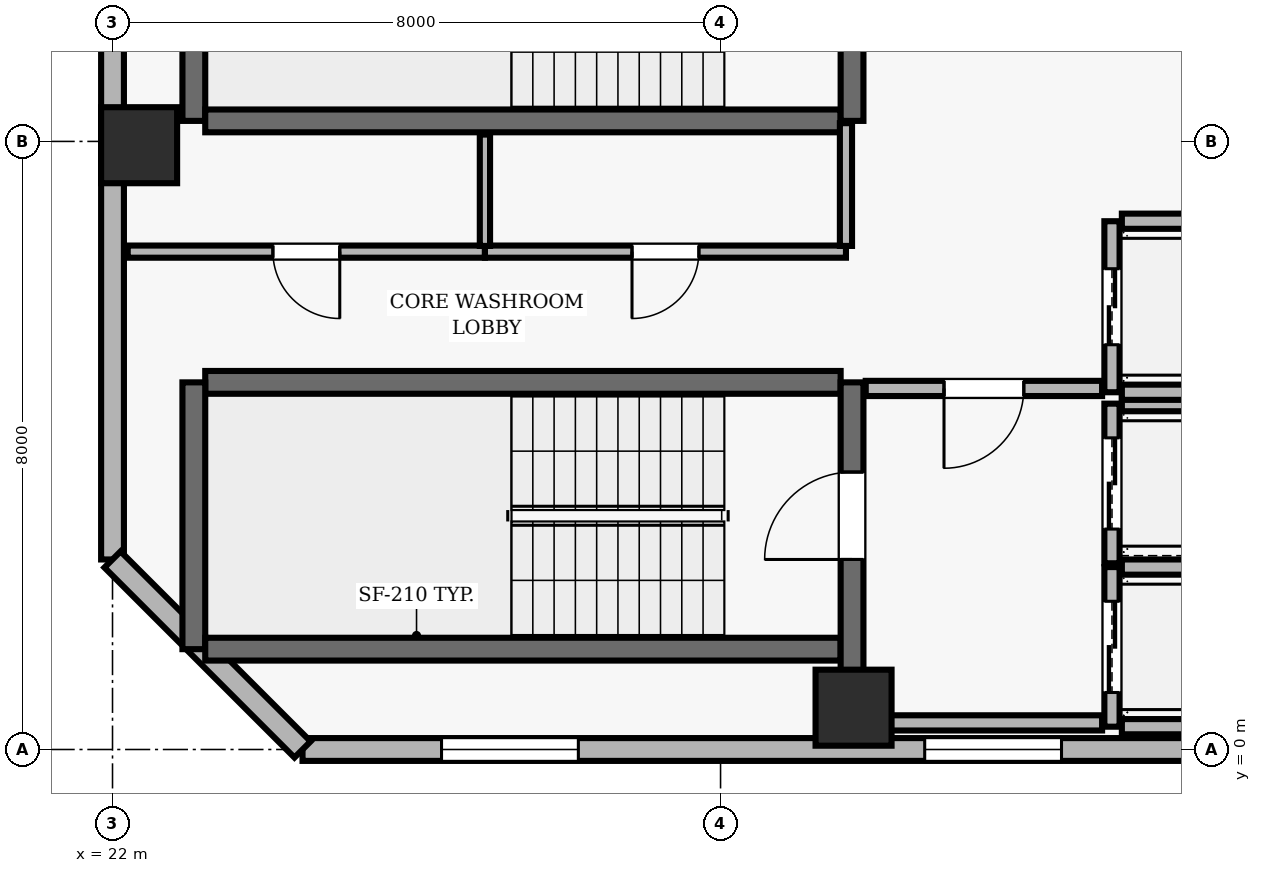
"""IFC4 building model, lengths in metres.
Left out: names, types, materials, properties, quantities, classifications, styles, units other than length and angle.
Written with IfcOpenShell. Run it as: python <this file> out.ifc"""

import sys

from ifc_helpers import new_model, si_unit, direction, frame, frame_2d, origin, origin_2d, place, context, subcontext, project, spatial, rectangle, extrude, element, fill, save


model = new_model("IFC4")
c1 = context("Model", 3, precision=1e-05, world=origin(), true_north=direction((0.0, 1.0)))
c2 = subcontext(c1, "Body", "Model", "MODEL_VIEW")
j1 = project(units=[si_unit("LENGTHUNIT", "METRE"), si_unit("PLANEANGLEUNIT", "RADIAN")], contexts=[c1])
p1 = place(None, origin())
s1 = spatial("IfcSite", under=j1, at=p1, CompositionType="ELEMENT")
p2 = place(p1, origin())
s2 = spatial("IfcBuilding", under=s1, at=p2, CompositionType="ELEMENT")
p3 = place(p2, frame((0.0, 0.0, 222.6)))
s3 = spatial("IfcBuildingStorey", under=s2, at=p3, CompositionType="ELEMENT", Elevation=222.6)
for number, where, z_axis, x_axis in (
    (1, (31.75, 0.55, 0.0), (0.0, 0.0, 1.0), (1.0, 0.0, 0.0)),
    (2, (22.35, 7.95, 0.0), (0.0, 0.0, 1.0), (1.0, 0.0, 0.0)),
):
    element("IfcColumn", number, at=place(p3, frame(where, z_axis=z_axis, x_axis=x_axis)), inside=s3, PredefinedType="COLUMN", context=c2, shape_type="SweptSolid", body=[
        extrude(rectangle(XDim=1.0, YDim=1.0, at=origin_2d()), origin(), (0.0, 0.0, 1.0), 3.9),
    ])
p4 = place(p3, frame((24.5, 0.0, 0.0), z_axis=(0.0, 0.0, 1.0), x_axis=(1.0, 0.0, 0.0)))
e3 = element("IfcWall", 3, at=p4, inside=s3, PredefinedType="SOLIDWALL", context=c2, shape_type="SweptSolid", body=[
    extrude(rectangle(XDim=38.2, YDim=0.3, at=frame_2d((19.1, 0.0))), origin(), (0.0, 0.0, 1.0), 3.69),
])
p5 = place(p4, frame((1.829, 0.0, 0.9)))
e4 = element("IfcOpeningElement", 4, at=p5, cuts=e3, PredefinedType="OPENING", context=c2, shape_type="SweptSolid", body=[
    extrude(rectangle(XDim=1.8, YDim=1.8, at=frame_2d((0.9, 0.9))), frame((0.0, 0.16, 0.0), z_axis=(0.0, -1.0, 0.0), x_axis=(1.0, 0.0, 0.0)), (0.0, 0.0, 1.0), 0.32),
])
p6 = place(p4, frame((8.186, 0.0, 0.9)))
e5 = element("IfcOpeningElement", 5, at=p6, cuts=e3, PredefinedType="OPENING", context=c2, shape_type="SweptSolid", body=[
    extrude(rectangle(XDim=1.8, YDim=1.8, at=frame_2d((0.9, 0.9))), frame((0.0, 0.16, 0.0), z_axis=(0.0, -1.0, 0.0), x_axis=(1.0, 0.0, 0.0)), (0.0, 0.0, 1.0), 0.32),
])
p7 = place(p4, frame((18.2, 0.0, 0.9)))
e6 = element("IfcOpeningElement", 6, at=p7, cuts=e3, PredefinedType="OPENING", context=c2, shape_type="SweptSolid", body=[
    extrude(rectangle(XDim=1.8, YDim=1.8, at=frame_2d((0.9, 0.9))), frame((0.0, 0.16, 0.0), z_axis=(0.0, -1.0, 0.0), x_axis=(1.0, 0.0, 0.0)), (0.0, 0.0, 1.0), 0.32),
])
p8 = place(p4, frame((24.107, 0.0, 0.9)))
e7 = element("IfcOpeningElement", 7, at=p8, cuts=e3, PredefinedType="OPENING", context=c2, shape_type="SweptSolid", body=[
    extrude(rectangle(XDim=1.8, YDim=1.8, at=frame_2d((0.9, 0.9))), frame((0.0, 0.16, 0.0), z_axis=(0.0, -1.0, 0.0), x_axis=(1.0, 0.0, 0.0)), (0.0, 0.0, 1.0), 0.32),
])
p9 = place(p4, frame((29.114, 0.0, 0.9)))
e8 = element("IfcOpeningElement", 8, at=p9, cuts=e3, PredefinedType="OPENING", context=c2, shape_type="SweptSolid", body=[
    extrude(rectangle(XDim=1.8, YDim=1.8, at=frame_2d((0.9, 0.9))), frame((0.0, 0.16, 0.0), z_axis=(0.0, -1.0, 0.0), x_axis=(1.0, 0.0, 0.0)), (0.0, 0.0, 1.0), 0.32),
])
p10 = place(p4, frame((34.571, 0.0, 0.9)))
e9 = element("IfcOpeningElement", 9, at=p10, cuts=e3, PredefinedType="OPENING", context=c2, shape_type="SweptSolid", body=[
    extrude(rectangle(XDim=1.8, YDim=1.8, at=frame_2d((0.9, 0.9))), frame((0.0, 0.16, 0.0), z_axis=(0.0, -1.0, 0.0), x_axis=(1.0, 0.0, 0.0)), (0.0, 0.0, 1.0), 0.32),
])
p11 = place(p3, frame((22.0, 40.7, 0.0), z_axis=(0.0, 0.0, 1.0), x_axis=(0.0, -1.0, 0.0)))
e10 = element("IfcWall", 10, at=p11, inside=s3, PredefinedType="SOLIDWALL", context=c2, shape_type="SweptSolid", body=[
    extrude(rectangle(XDim=38.2, YDim=0.3, at=frame_2d((19.1, 0.0))), origin(), (0.0, 0.0, 1.0), 3.69),
])
p12 = place(p11, frame((7.8, 0.0, 0.0)))
e11 = element("IfcOpeningElement", 11, at=p12, cuts=e10, PredefinedType="OPENING", context=c2, shape_type="SweptSolid", body=[
    extrude(rectangle(XDim=1.0, YDim=2.2, at=frame_2d((0.5, 1.1))), frame((0.0, 0.16, 0.0), z_axis=(0.0, -1.0, 0.0), x_axis=(1.0, 0.0, 0.0)), (0.0, 0.0, 1.0), 0.32),
])
p13 = place(p11, frame((2.279, 0.0, 0.9)))
e12 = element("IfcOpeningElement", 12, at=p13, cuts=e10, PredefinedType="OPENING", context=c2, shape_type="SweptSolid", body=[
    extrude(rectangle(XDim=1.8, YDim=1.8, at=frame_2d((0.9, 0.9))), frame((0.0, 0.16, 0.0), z_axis=(0.0, -1.0, 0.0), x_axis=(1.0, 0.0, 0.0)), (0.0, 0.0, 1.0), 0.32),
])
p14 = place(p11, frame((12.293, 0.0, 0.9)))
e13 = element("IfcOpeningElement", 13, at=p14, cuts=e10, PredefinedType="OPENING", context=c2, shape_type="SweptSolid", body=[
    extrude(rectangle(XDim=1.8, YDim=1.8, at=frame_2d((0.9, 0.9))), frame((0.0, 0.16, 0.0), z_axis=(0.0, -1.0, 0.0), x_axis=(1.0, 0.0, 0.0)), (0.0, 0.0, 1.0), 0.32),
])
p15 = place(p11, frame((18.2, 0.0, 0.9)))
e14 = element("IfcOpeningElement", 14, at=p15, cuts=e10, PredefinedType="OPENING", context=c2, shape_type="SweptSolid", body=[
    extrude(rectangle(XDim=1.8, YDim=1.8, at=frame_2d((0.9, 0.9))), frame((0.0, 0.16, 0.0), z_axis=(0.0, -1.0, 0.0), x_axis=(1.0, 0.0, 0.0)), (0.0, 0.0, 1.0), 0.32),
])
p16 = place(p11, frame((23.207, 0.0, 0.9)))
e15 = element("IfcOpeningElement", 15, at=p16, cuts=e10, PredefinedType="OPENING", context=c2, shape_type="SweptSolid", body=[
    extrude(rectangle(XDim=1.8, YDim=1.8, at=frame_2d((0.9, 0.9))), frame((0.0, 0.16, 0.0), z_axis=(0.0, -1.0, 0.0), x_axis=(1.0, 0.0, 0.0)), (0.0, 0.0, 1.0), 0.32),
])
p17 = place(p11, frame((29.114, 0.0, 0.9)))
e16 = element("IfcOpeningElement", 16, at=p17, cuts=e10, PredefinedType="OPENING", context=c2, shape_type="SweptSolid", body=[
    extrude(rectangle(XDim=1.8, YDim=1.8, at=frame_2d((0.9, 0.9))), frame((0.0, 0.16, 0.0), z_axis=(0.0, -1.0, 0.0), x_axis=(1.0, 0.0, 0.0)), (0.0, 0.0, 1.0), 0.32),
])
p18 = place(p3, frame((22.0, 2.5, 0.0), z_axis=(0.0, 0.0, 1.0), x_axis=(0.707106781187, -0.707106781187, 0.0)))
e17 = element("IfcWall", 17, at=p18, inside=s3, PredefinedType="SOLIDWALL", context=c2, shape_type="SweptSolid", body=[
    extrude(rectangle(XDim=3.536, YDim=0.3, at=frame_2d((1.768, 0.0))), origin(), (0.0, 0.0, 1.0), 3.69),
])
p19 = place(p3, frame((31.58, 4.83, 0.0), z_axis=(0.0, 0.0, 1.0), x_axis=(-1.0, 0.0, 0.0)))
e18 = element("IfcWall", 18, at=p19, inside=s3, PredefinedType="SHEAR", context=c2, shape_type="SweptSolid", body=[
    extrude(rectangle(XDim=8.36, YDim=0.3, at=frame_2d((4.18, 0.0))), origin(), (0.0, 0.0, 1.0), 3.69),
])
p20 = place(p3, frame((23.07, 4.83, 0.0), z_axis=(0.0, 0.0, 1.0), x_axis=(0.0, -1.0, 0.0)))
e19 = element("IfcWall", 19, at=p20, inside=s3, PredefinedType="SHEAR", context=c2, shape_type="SweptSolid", body=[
    extrude(rectangle(XDim=3.51, YDim=0.3, at=frame_2d((1.755, 0.0))), origin(), (0.0, 0.0, 1.0), 3.69),
])
p21 = place(p3, frame((23.22, 1.32, 0.0), z_axis=(0.0, 0.0, 1.0), x_axis=(1.0, 0.0, 0.0)))
e20 = element("IfcWall", 20, at=p21, inside=s3, PredefinedType="SHEAR", context=c2, shape_type="SweptSolid", body=[
    extrude(rectangle(XDim=8.36, YDim=0.3, at=frame_2d((4.18, 0.0))), origin(), (0.0, 0.0, 1.0), 3.69),
])
p22 = place(p3, frame((31.73, 0.96, 0.0), z_axis=(0.0, 0.0, 1.0), x_axis=(0.0, 1.0, 0.0)))
e21 = element("IfcWall", 21, at=p22, inside=s3, PredefinedType="SHEAR", context=c2, shape_type="SweptSolid", body=[
    extrude(rectangle(XDim=3.87, YDim=0.3, at=frame_2d((1.935, 0.0))), origin(), (0.0, 0.0, 1.0), 3.69),
])
p23 = place(p22, frame((1.54, 0.0, 0.0)))
e22 = element("IfcOpeningElement", 22, at=p23, cuts=e21, PredefinedType="OPENING", context=c2, shape_type="SweptSolid", body=[
    extrude(rectangle(XDim=1.15, YDim=2.15, at=frame_2d((0.575, 1.075))), frame((0.0, 0.16, 0.0), z_axis=(0.0, -1.0, 0.0), x_axis=(1.0, 0.0, 0.0)), (0.0, 0.0, 1.0), 0.32),
])
p24 = place(p3, frame((23.07, 11.78, 0.0), z_axis=(0.0, 0.0, 1.0), x_axis=(0.0, -1.0, 0.0)))
e23 = element("IfcWall", 23, at=p24, inside=s3, PredefinedType="SHEAR", context=c2, shape_type="SweptSolid", body=[
    extrude(rectangle(XDim=3.51, YDim=0.3, at=frame_2d((1.755, 0.0))), origin(), (0.0, 0.0, 1.0), 3.69),
])
p25 = place(p3, frame((23.22, 8.27, 0.0), z_axis=(0.0, 0.0, 1.0), x_axis=(1.0, 0.0, 0.0)))
e24 = element("IfcWall", 24, at=p25, inside=s3, PredefinedType="SHEAR", context=c2, shape_type="SweptSolid", body=[
    extrude(rectangle(XDim=8.36, YDim=0.3, at=frame_2d((4.18, 0.0))), origin(), (0.0, 0.0, 1.0), 3.69),
])
p26 = place(p3, frame((31.73, 8.27, 0.0), z_axis=(0.0, 0.0, 1.0), x_axis=(0.0, 1.0, 0.0)))
e25 = element("IfcWall", 25, at=p26, inside=s3, PredefinedType="SHEAR", context=c2, shape_type="SweptSolid", body=[
    extrude(rectangle(XDim=3.51, YDim=0.3, at=frame_2d((1.755, 0.0))), origin(), (0.0, 0.0, 1.0), 3.69),
])
p27 = place(p26, frame((1.18, 0.0, 0.0)))
e26 = element("IfcOpeningElement", 26, at=p27, cuts=e25, PredefinedType="OPENING", context=c2, shape_type="SweptSolid", body=[
    extrude(rectangle(XDim=1.15, YDim=2.15, at=frame_2d((0.575, 1.075))), frame((0.0, 0.16, 0.0), z_axis=(0.0, -1.0, 0.0), x_axis=(1.0, 0.0, 0.0)), (0.0, 0.0, 1.0), 0.32),
])
p28 = place(p3, frame((35.15, 2.4, 0.0), z_axis=(0.0, 0.0, 1.0), x_axis=(0.0, -1.0, 0.0)))
e27 = element("IfcWall", 27, at=p28, inside=s3, PredefinedType="SOLIDWALL", context=c2, shape_type="SweptSolid", body=[
    extrude(rectangle(XDim=2.1, YDim=0.2, at=frame_2d((1.05, 0.0))), origin(), (0.0, 0.0, 1.0), 3.69),
])
p29 = place(p28, frame((0.45, 0.0, 0.0)))
e28 = element("IfcOpeningElement", 28, at=p29, cuts=e27, PredefinedType="OPENING", context=c2, shape_type="SweptSolid", body=[
    extrude(rectangle(XDim=1.2, YDim=2.15, at=frame_2d((0.6, 1.075))), frame((0.0, 0.11, 0.0), z_axis=(0.0, -1.0, 0.0), x_axis=(1.0, 0.0, 0.0)), (0.0, 0.0, 1.0), 0.22),
])
for number, where, z_axis, x_axis in (
    (29, (35.28, 0.3, 0.0), (0.0, 0.0, 1.0), (1.0, 0.0, 0.0)),
    (30, (37.42, 2.4, 0.0), (0.0, 0.0, 1.0), (-1.0, 0.0, 0.0)),
):
    element("IfcWall", number, at=place(p3, frame(where, z_axis=z_axis, x_axis=x_axis)), inside=s3, PredefinedType="SOLIDWALL", context=c2, shape_type="SweptSolid", body=[
        extrude(rectangle(XDim=2.14, YDim=0.2, at=frame_2d((1.07, 0.0))), origin(), (0.0, 0.0, 1.0), 3.69),
    ])
p30 = place(p3, frame((35.15, 4.55, 0.0), z_axis=(0.0, 0.0, 1.0), x_axis=(0.0, -1.0, 0.0)))
e31 = element("IfcWall", 31, at=p30, inside=s3, PredefinedType="SOLIDWALL", context=c2, shape_type="SweptSolid", body=[
    extrude(rectangle(XDim=2.1, YDim=0.2, at=frame_2d((1.05, 0.0))), origin(), (0.0, 0.0, 1.0), 3.69),
])
p31 = place(p30, frame((0.45, 0.0, 0.0)))
e32 = element("IfcOpeningElement", 32, at=p31, cuts=e31, PredefinedType="OPENING", context=c2, shape_type="SweptSolid", body=[
    extrude(rectangle(XDim=1.2, YDim=2.15, at=frame_2d((0.6, 1.075))), frame((0.0, 0.11, 0.0), z_axis=(0.0, -1.0, 0.0), x_axis=(1.0, 0.0, 0.0)), (0.0, 0.0, 1.0), 0.22),
])
p32 = place(p3, frame((37.42, 4.55, 0.0), z_axis=(0.0, 0.0, 1.0), x_axis=(-1.0, 0.0, 0.0)))
e33 = element("IfcWall", 33, at=p32, inside=s3, PredefinedType="SOLIDWALL", context=c2, shape_type="SweptSolid", body=[
    extrude(rectangle(XDim=2.14, YDim=0.2, at=frame_2d((1.07, 0.0))), origin(), (0.0, 0.0, 1.0), 3.69),
])
p33 = place(p3, frame((35.15, 6.95, 0.0), z_axis=(0.0, 0.0, 1.0), x_axis=(0.0, -1.0, 0.0)))
e34 = element("IfcWall", 34, at=p33, inside=s3, PredefinedType="SOLIDWALL", context=c2, shape_type="SweptSolid", body=[
    extrude(rectangle(XDim=2.25, YDim=0.2, at=frame_2d((1.125, 0.0))), origin(), (0.0, 0.0, 1.0), 3.69),
])
p34 = place(p33, frame((0.625, 0.0, 0.0)))
e35 = element("IfcOpeningElement", 35, at=p34, cuts=e34, PredefinedType="OPENING", context=c2, shape_type="SweptSolid", body=[
    extrude(rectangle(XDim=1.0, YDim=2.1, at=frame_2d((0.5, 1.05))), frame((0.0, 0.11, 0.0), z_axis=(0.0, -1.0, 0.0), x_axis=(1.0, 0.0, 0.0)), (0.0, 0.0, 1.0), 0.22),
])
for number, where, z_axis, x_axis in (
    (36, (35.28, 4.7, 0.0), (0.0, 0.0, 1.0), (1.0, 0.0, 0.0)),
    (37, (37.42, 6.95, 0.0), (0.0, 0.0, 1.0), (-1.0, 0.0, 0.0)),
):
    element("IfcWall", number, at=place(p3, frame(where, z_axis=z_axis, x_axis=x_axis)), inside=s3, PredefinedType="SOLIDWALL", context=c2, shape_type="SweptSolid", body=[
        extrude(rectangle(XDim=2.14, YDim=0.2, at=frame_2d((1.07, 0.0))), origin(), (0.0, 0.0, 1.0), 3.69),
    ])
p35 = place(p3, frame((26.9, 6.55, 0.0), z_axis=(0.0, 0.0, 1.0), x_axis=(-1.0, 0.0, 0.0)))
e38 = element("IfcWall", 38, at=p35, inside=s3, PredefinedType="PARTITIONING", context=c2, shape_type="SweptSolid", body=[
    extrude(rectangle(XDim=4.7, YDim=0.16, at=frame_2d((2.35, 0.0))), origin(), (0.0, 0.0, 1.0), 3.69),
])
p36 = place(p35, frame((1.91, 0.0, 0.0)))
e39 = element("IfcOpeningElement", 39, at=p36, cuts=e38, PredefinedType="OPENING", context=c2, shape_type="SweptSolid", body=[
    extrude(rectangle(XDim=0.88, YDim=2.1, at=frame_2d((0.44, 1.05))), frame((0.0, 0.09, 0.0), z_axis=(0.0, -1.0, 0.0), x_axis=(1.0, 0.0, 0.0)), (0.0, 0.0, 1.0), 0.18),
])
p37 = place(p3, frame((31.65, 0.35, 0.0), z_axis=(0.0, 0.0, 1.0), x_axis=(1.0, 0.0, 0.0)))
e40 = element("IfcWall", 40, at=p37, inside=s3, PredefinedType="SOLIDWALL", context=c2, shape_type="SweptSolid", body=[
    extrude(rectangle(XDim=3.37, YDim=0.2, at=frame_2d((1.685, 0.0))), origin(), (0.0, 0.0, 1.0), 3.69),
])
p38 = place(p3, frame((31.65, 6.55, 0.0), z_axis=(0.0, 0.0, 1.0), x_axis=(-1.0, 0.0, 0.0)))
e41 = element("IfcWall", 41, at=p38, inside=s3, PredefinedType="PARTITIONING", context=c2, shape_type="SweptSolid", body=[
    extrude(rectangle(XDim=4.75, YDim=0.16, at=frame_2d((2.375, 0.0))), origin(), (0.0, 0.0, 1.0), 3.69),
])
p39 = place(p38, frame((1.935, 0.0, 0.0)))
e42 = element("IfcOpeningElement", 42, at=p39, cuts=e41, PredefinedType="OPENING", context=c2, shape_type="SweptSolid", body=[
    extrude(rectangle(XDim=0.88, YDim=2.1, at=frame_2d((0.44, 1.05))), frame((0.0, 0.09, 0.0), z_axis=(0.0, -1.0, 0.0), x_axis=(1.0, 0.0, 0.0)), (0.0, 0.0, 1.0), 0.18),
])
p40 = place(p3, frame((35.02, 4.75, 0.0), z_axis=(0.0, 0.0, 1.0), x_axis=(-1.0, 0.0, 0.0)))
e43 = element("IfcWall", 43, at=p40, inside=s3, PredefinedType="SOLIDWALL", context=c2, shape_type="SweptSolid", body=[
    extrude(rectangle(XDim=3.11, YDim=0.2, at=frame_2d((1.555, 0.0))), origin(), (0.0, 0.0, 1.0), 3.69),
])
p41 = place(p40, frame((1.03, 0.0, 0.0)))
e44 = element("IfcOpeningElement", 44, at=p41, cuts=e43, PredefinedType="OPENING", context=c2, shape_type="SweptSolid", body=[
    extrude(rectangle(XDim=1.05, YDim=2.15, at=frame_2d((0.525, 1.075))), frame((0.0, 0.11, 0.0), z_axis=(0.0, -1.0, 0.0), x_axis=(1.0, 0.0, 0.0)), (0.0, 0.0, 1.0), 0.22),
])
p42 = place(p3, frame((26.9, 6.625, 0.0), z_axis=(0.0, 0.0, 1.0), x_axis=(0.0, 1.0, 0.0)))
e45 = element("IfcWall", 45, at=p42, inside=s3, PredefinedType="PARTITIONING", context=c2, shape_type="SweptSolid", body=[
    extrude(rectangle(XDim=1.465, YDim=0.135, at=frame_2d((0.732, 0.0))), origin(), (0.0, 0.0, 1.0), 3.69),
])
p43 = place(p3, frame((31.65, 8.24, 0.0), z_axis=(0.0, 0.0, 1.0), x_axis=(0.0, -1.0, 0.0)))
e46 = element("IfcWall", 46, at=p43, inside=s3, PredefinedType="PARTITIONING", context=c2, shape_type="SweptSolid", body=[
    extrude(rectangle(XDim=1.615, YDim=0.16, at=frame_2d((0.808, 0.0))), origin(), (0.0, 0.0, 1.0), 3.69),
])
p44 = place(p5, origin())
e47 = element("IfcWindow", 47, at=p44, inside=s3, PartitioningType="SINGLE_PANEL", PredefinedType="WINDOW", context=c2, shape_type="SweptSolid", body=[
    extrude(rectangle(XDim=1.8, YDim=1.8, at=frame_2d((0.9, 0.9))), frame((0.0, 0.03, 0.0), z_axis=(0.0, -1.0, 0.0), x_axis=(1.0, 0.0, 0.0)), (0.0, 0.0, 1.0), 0.06),
])
fill(e4, e47)
p45 = place(p6, origin())
e48 = element("IfcWindow", 48, at=p45, inside=s3, PartitioningType="SINGLE_PANEL", PredefinedType="WINDOW", context=c2, shape_type="SweptSolid", body=[
    extrude(rectangle(XDim=1.8, YDim=1.8, at=frame_2d((0.9, 0.9))), frame((0.0, 0.03, 0.0), z_axis=(0.0, -1.0, 0.0), x_axis=(1.0, 0.0, 0.0)), (0.0, 0.0, 1.0), 0.06),
])
fill(e5, e48)
p46 = place(p23, origin())
e49 = element("IfcDoor", 49, at=p46, inside=s3, OperationType="SINGLE_SWING_LEFT", PredefinedType="DOOR", context=c2, shape_type="SweptSolid", body=[
    extrude(rectangle(XDim=1.15, YDim=2.15, at=frame_2d((0.575, 1.075))), frame((0.0, 0.025, 0.0), z_axis=(0.0, -1.0, 0.0), x_axis=(1.0, 0.0, 0.0)), (0.0, 0.0, 1.0), 0.05),
])
fill(e22, e49)
p47 = place(p29, origin())
e50 = element("IfcDoor", 50, at=p47, inside=s3, OperationType="DOUBLE_DOOR_SLIDING", PredefinedType="DOOR", context=c2, shape_type="SweptSolid", body=[
    extrude(rectangle(XDim=1.2, YDim=2.15, at=frame_2d((0.6, 1.075))), frame((0.0, 0.025, 0.0), z_axis=(0.0, -1.0, 0.0), x_axis=(1.0, 0.0, 0.0)), (0.0, 0.0, 1.0), 0.05),
])
fill(e28, e50)
p48 = place(p31, origin())
e51 = element("IfcDoor", 51, at=p48, inside=s3, OperationType="DOUBLE_DOOR_SLIDING", PredefinedType="DOOR", context=c2, shape_type="SweptSolid", body=[
    extrude(rectangle(XDim=1.2, YDim=2.15, at=frame_2d((0.6, 1.075))), frame((0.0, 0.025, 0.0), z_axis=(0.0, -1.0, 0.0), x_axis=(1.0, 0.0, 0.0)), (0.0, 0.0, 1.0), 0.05),
])
fill(e32, e51)
p49 = place(p34, origin())
e52 = element("IfcDoor", 52, at=p49, inside=s3, OperationType="DOUBLE_DOOR_SLIDING", PredefinedType="DOOR", context=c2, shape_type="SweptSolid", body=[
    extrude(rectangle(XDim=1.0, YDim=2.1, at=frame_2d((0.5, 1.05))), frame((0.0, 0.025, 0.0), z_axis=(0.0, -1.0, 0.0), x_axis=(1.0, 0.0, 0.0)), (0.0, 0.0, 1.0), 0.05),
])
fill(e35, e52)
p50 = place(p41, origin())
e53 = element("IfcDoor", 53, at=p50, inside=s3, OperationType="SINGLE_SWING_RIGHT", PredefinedType="DOOR", context=c2, shape_type="SweptSolid", body=[
    extrude(rectangle(XDim=1.05, YDim=2.15, at=frame_2d((0.525, 1.075))), frame((0.0, 0.025, 0.0), z_axis=(0.0, -1.0, 0.0), x_axis=(1.0, 0.0, 0.0)), (0.0, 0.0, 1.0), 0.05),
])
fill(e44, e53)
p51 = place(p36, origin())
e54 = element("IfcDoor", 54, at=p51, inside=s3, OperationType="SINGLE_SWING_LEFT", PredefinedType="DOOR", context=c2, shape_type="SweptSolid", body=[
    extrude(rectangle(XDim=0.88, YDim=2.1, at=frame_2d((0.44, 1.05))), frame((0.0, 0.025, 0.0), z_axis=(0.0, -1.0, 0.0), x_axis=(1.0, 0.0, 0.0)), (0.0, 0.0, 1.0), 0.05),
])
fill(e39, e54)
p52 = place(p39, origin())
e55 = element("IfcDoor", 55, at=p52, inside=s3, OperationType="SINGLE_SWING_RIGHT", PredefinedType="DOOR", context=c2, shape_type="SweptSolid", body=[
    extrude(rectangle(XDim=0.88, YDim=2.1, at=frame_2d((0.44, 1.05))), frame((0.0, 0.025, 0.0), z_axis=(0.0, -1.0, 0.0), x_axis=(1.0, 0.0, 0.0)), (0.0, 0.0, 1.0), 0.05),
])
fill(e42, e55)
save(model, sys.argv[1])
